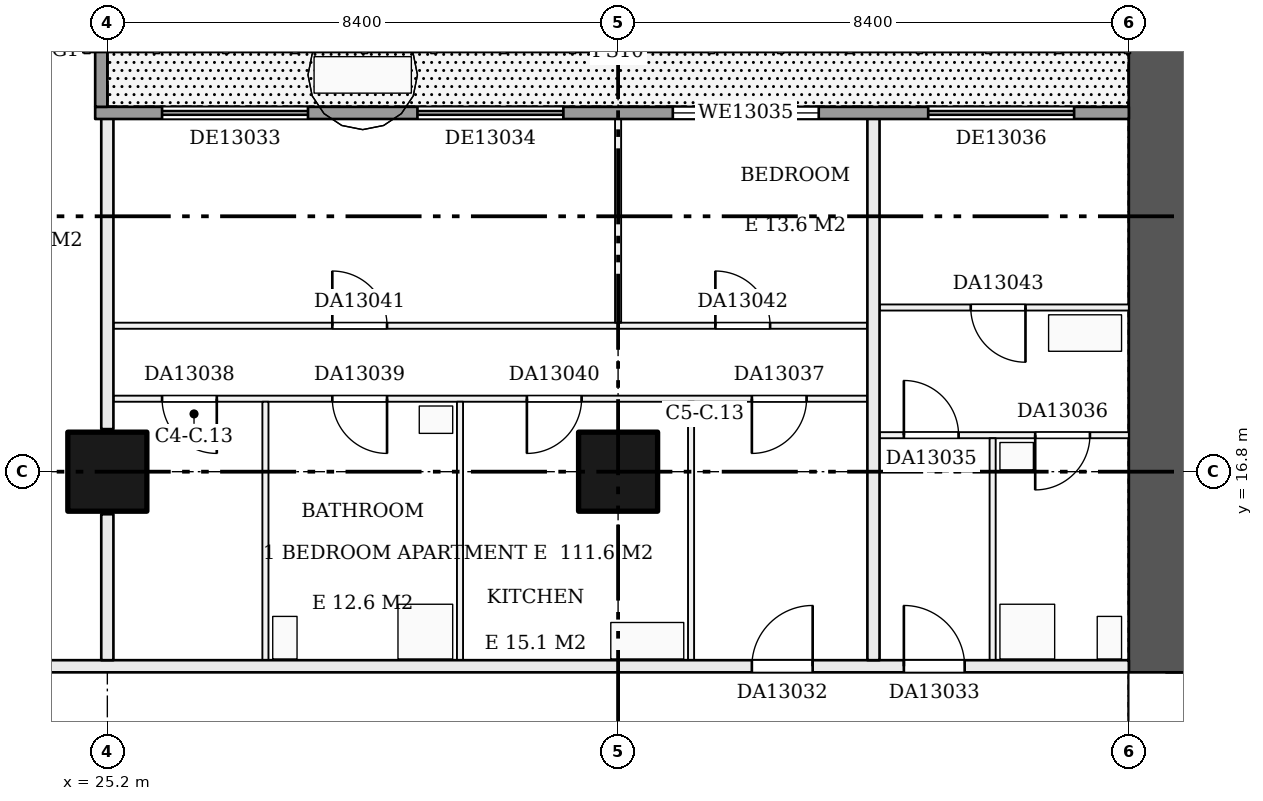
"""IFC4 building model, lengths in metres.
Left out: names, types, materials, properties, quantities, classifications, styles, units other than length and angle.
Written with IfcOpenShell. Run it as: python <this file> out.ifc"""

import sys

from ifc_helpers import new_model, si_unit, direction, frame, frame_2d, origin, origin_2d, place, context, subcontext, project, spatial, rectangle, extrude, element, fill, save


model = new_model("IFC4")
c1 = context("Model", 3, precision=1e-05, world=origin(), true_north=direction((0.0, 1.0)))
c2 = subcontext(c1, "Body", "Model", "MODEL_VIEW")
j1 = project(units=[si_unit("LENGTHUNIT", "METRE"), si_unit("PLANEANGLEUNIT", "RADIAN")], contexts=[c1])
p1 = place(None, origin())
s1 = spatial("IfcSite", under=j1, at=p1, CompositionType="ELEMENT")
p2 = place(p1, origin())
s2 = spatial("IfcBuilding", under=s1, at=p2, CompositionType="ELEMENT")
p3 = place(p2, frame((0.0, 0.0, 56.7)))
s3 = spatial("IfcBuildingStorey", under=s2, at=p3, CompositionType="ELEMENT", Elevation=56.7)
for number, where, z_axis, x_axis in (
    (1, (25.2, 16.8, 0.0), (0.0, 0.0, 1.0), (1.0, 0.0, 0.0)),
    (2, (33.6, 16.8, 0.0), (0.0, 0.0, 1.0), (1.0, 0.0, 0.0)),
):
    element("IfcColumn", number, at=place(p3, frame(where, z_axis=z_axis, x_axis=x_axis)), inside=s3, PredefinedType="COLUMN", context=c2, shape_type="SweptSolid", body=[
        extrude(rectangle(XDim=1.3, YDim=1.3, at=origin_2d()), origin(), (0.0, 0.0, 1.0), 3.22),
    ])
p4 = place(p3, frame((42.6, 9.6, 0.0), z_axis=(0.0, 0.0, 1.0), x_axis=(0.0, 1.0, 0.0)))
e3 = element("IfcWall", 3, at=p4, inside=s3, PredefinedType="SHEAR", context=c2, shape_type="SweptSolid", body=[
    extrude(rectangle(XDim=14.4, YDim=1.2, at=frame_2d((7.2, 0.0))), origin(), (0.0, 0.0, 1.0), 3.22),
])
p5 = place(p4, frame((2.1, 0.0, 0.0)))
e4 = element("IfcOpeningElement", 4, at=p5, cuts=e3, PredefinedType="OPENING", context=c2, shape_type="SweptSolid", body=[
    extrude(rectangle(XDim=1.8, YDim=2.1, at=frame_2d((0.9, 1.05))), frame((0.0, 0.61, 0.0), z_axis=(0.0, -1.0, 0.0), x_axis=(1.0, 0.0, 0.0)), (0.0, 0.0, 1.0), 1.22),
])
p6 = place(p3, frame((16.9, 13.6, 0.0), z_axis=(0.0, 0.0, 1.0), x_axis=(1.0, 0.0, 0.0)))
e5 = element("IfcWall", 5, at=p6, inside=s3, PredefinedType="PARTITIONING", context=c2, shape_type="SweptSolid", body=[
    extrude(rectangle(XDim=25.1, YDim=0.2, at=frame_2d((12.55, 0.0))), origin(), (0.0, 0.0, 1.0), 3.22),
])
p7 = place(p6, frame((18.9, 0.0, 0.0)))
e6 = element("IfcOpeningElement", 6, at=p7, cuts=e5, PredefinedType="OPENING", context=c2, shape_type="SweptSolid", body=[
    extrude(rectangle(XDim=1.0, YDim=2.1, at=frame_2d((0.5, 1.05))), frame((0.0, 0.11, 0.0), z_axis=(0.0, -1.0, 0.0), x_axis=(1.0, 0.0, 0.0)), (0.0, 0.0, 1.0), 0.22),
])
p8 = place(p6, frame((21.4, 0.0, 0.0)))
e7 = element("IfcOpeningElement", 7, at=p8, cuts=e5, PredefinedType="OPENING", context=c2, shape_type="SweptSolid", body=[
    extrude(rectangle(XDim=1.0, YDim=2.1, at=frame_2d((0.5, 1.05))), frame((0.0, 0.11, 0.0), z_axis=(0.0, -1.0, 0.0), x_axis=(1.0, 0.0, 0.0)), (0.0, 0.0, 1.0), 0.22),
])
p9 = place(p6, frame((5.2, 0.0, 0.0)))
e8 = element("IfcOpeningElement", 8, at=p9, cuts=e5, PredefinedType="OPENING", context=c2, shape_type="SweptSolid", body=[
    extrude(rectangle(XDim=1.0, YDim=2.1, at=frame_2d((0.5, 1.05))), frame((0.0, 0.11, 0.0), z_axis=(0.0, -1.0, 0.0), x_axis=(1.0, 0.0, 0.0)), (0.0, 0.0, 1.0), 0.22),
])
p10 = place(p3, frame((37.9, 17.4, 0.0), z_axis=(0.0, 0.0, 1.0), x_axis=(1.0, 0.0, 0.0)))
e9 = element("IfcWall", 9, at=p10, inside=s3, PredefinedType="PARTITIONING", context=c2, shape_type="SweptSolid", body=[
    extrude(rectangle(XDim=4.1, YDim=0.1, at=frame_2d((2.05, 0.0))), origin(), (0.0, 0.0, 1.0), 3.22),
])
p11 = place(p10, frame((0.4, 0.0, 0.0)))
e10 = element("IfcOpeningElement", 10, at=p11, cuts=e9, PredefinedType="OPENING", context=c2, shape_type="SweptSolid", body=[
    extrude(rectangle(XDim=0.9, YDim=2.1, at=frame_2d((0.45, 1.05))), frame((0.0, 0.06, 0.0), z_axis=(0.0, -1.0, 0.0), x_axis=(1.0, 0.0, 0.0)), (0.0, 0.0, 1.0), 0.12),
])
p12 = place(p10, frame((2.56, 0.0, 0.0)))
e11 = element("IfcOpeningElement", 11, at=p12, cuts=e9, PredefinedType="OPENING", context=c2, shape_type="SweptSolid", body=[
    extrude(rectangle(XDim=0.9, YDim=2.1, at=frame_2d((0.45, 1.05))), frame((0.0, 0.06, 0.0), z_axis=(0.0, -1.0, 0.0), x_axis=(1.0, 0.0, 0.0)), (0.0, 0.0, 1.0), 0.12),
])
p13 = place(p3, frame((25.3, 18.0, 0.0), z_axis=(0.0, 0.0, 1.0), x_axis=(1.0, 0.0, 0.0)))
e12 = element("IfcWall", 12, at=p13, inside=s3, PredefinedType="PARTITIONING", context=c2, shape_type="SweptSolid", body=[
    extrude(rectangle(XDim=12.4, YDim=0.1, at=frame_2d((6.2, 0.0))), origin(), (0.0, 0.0, 1.0), 3.22),
])
p14 = place(p13, frame((10.5, 0.0, 0.0)))
e13 = element("IfcOpeningElement", 13, at=p14, cuts=e12, PredefinedType="OPENING", context=c2, shape_type="SweptSolid", body=[
    extrude(rectangle(XDim=0.9, YDim=2.1, at=frame_2d((0.45, 1.05))), frame((0.0, 0.06, 0.0), z_axis=(0.0, -1.0, 0.0), x_axis=(1.0, 0.0, 0.0)), (0.0, 0.0, 1.0), 0.12),
])
p15 = place(p13, frame((0.8, 0.0, 0.0)))
e14 = element("IfcOpeningElement", 14, at=p15, cuts=e12, PredefinedType="OPENING", context=c2, shape_type="SweptSolid", body=[
    extrude(rectangle(XDim=0.9, YDim=2.1, at=frame_2d((0.45, 1.05))), frame((0.0, 0.06, 0.0), z_axis=(0.0, -1.0, 0.0), x_axis=(1.0, 0.0, 0.0)), (0.0, 0.0, 1.0), 0.12),
])
p16 = place(p13, frame((3.6, 0.0, 0.0)))
e15 = element("IfcOpeningElement", 15, at=p16, cuts=e12, PredefinedType="OPENING", context=c2, shape_type="SweptSolid", body=[
    extrude(rectangle(XDim=0.9, YDim=2.1, at=frame_2d((0.45, 1.05))), frame((0.0, 0.06, 0.0), z_axis=(0.0, -1.0, 0.0), x_axis=(1.0, 0.0, 0.0)), (0.0, 0.0, 1.0), 0.12),
])
p17 = place(p13, frame((6.8, 0.0, 0.0)))
e16 = element("IfcOpeningElement", 16, at=p17, cuts=e12, PredefinedType="OPENING", context=c2, shape_type="SweptSolid", body=[
    extrude(rectangle(XDim=0.9, YDim=2.1, at=frame_2d((0.45, 1.05))), frame((0.0, 0.06, 0.0), z_axis=(0.0, -1.0, 0.0), x_axis=(1.0, 0.0, 0.0)), (0.0, 0.0, 1.0), 0.12),
])
p18 = place(p3, frame((25.3, 19.2, 0.0), z_axis=(0.0, 0.0, 1.0), x_axis=(1.0, 0.0, 0.0)))
e17 = element("IfcWall", 17, at=p18, inside=s3, PredefinedType="PARTITIONING", context=c2, shape_type="SweptSolid", body=[
    extrude(rectangle(XDim=12.4, YDim=0.1, at=frame_2d((6.2, 0.0))), origin(), (0.0, 0.0, 1.0), 3.22),
])
p19 = place(p18, frame((3.6, 0.0, 0.0)))
e18 = element("IfcOpeningElement", 18, at=p19, cuts=e17, PredefinedType="OPENING", context=c2, shape_type="SweptSolid", body=[
    extrude(rectangle(XDim=0.9, YDim=2.1, at=frame_2d((0.45, 1.05))), frame((0.0, 0.06, 0.0), z_axis=(0.0, -1.0, 0.0), x_axis=(1.0, 0.0, 0.0)), (0.0, 0.0, 1.0), 0.12),
])
p20 = place(p18, frame((9.9, 0.0, 0.0)))
e19 = element("IfcOpeningElement", 19, at=p20, cuts=e17, PredefinedType="OPENING", context=c2, shape_type="SweptSolid", body=[
    extrude(rectangle(XDim=0.9, YDim=2.1, at=frame_2d((0.45, 1.05))), frame((0.0, 0.06, 0.0), z_axis=(0.0, -1.0, 0.0), x_axis=(1.0, 0.0, 0.0)), (0.0, 0.0, 1.0), 0.12),
])
p21 = place(p3, frame((37.9, 19.5, 0.0), z_axis=(0.0, 0.0, 1.0), x_axis=(1.0, 0.0, 0.0)))
e20 = element("IfcWall", 20, at=p21, inside=s3, PredefinedType="PARTITIONING", context=c2, shape_type="SweptSolid", body=[
    extrude(rectangle(XDim=4.1, YDim=0.1, at=frame_2d((2.05, 0.0))), origin(), (0.0, 0.0, 1.0), 3.22),
])
p22 = place(p21, frame((1.5, 0.0, 0.0)))
e21 = element("IfcOpeningElement", 21, at=p22, cuts=e20, PredefinedType="OPENING", context=c2, shape_type="SweptSolid", body=[
    extrude(rectangle(XDim=0.9, YDim=2.1, at=frame_2d((0.45, 1.05))), frame((0.0, 0.06, 0.0), z_axis=(0.0, -1.0, 0.0), x_axis=(1.0, 0.0, 0.0)), (0.0, 0.0, 1.0), 0.12),
])
p23 = place(p3, frame((25.2, 13.7, 0.0), z_axis=(0.0, 0.0, 1.0), x_axis=(0.0, 1.0, 0.0)))
e22 = element("IfcWall", 22, at=p23, inside=s3, PredefinedType="PARTITIONING", context=c2, shape_type="SweptSolid", body=[
    extrude(rectangle(XDim=2.4, YDim=0.2, at=frame_2d((1.2, 0.0))), origin(), (0.0, 0.0, 1.0), 3.22),
])
p24 = place(p3, frame((25.2, 17.5, 0.0), z_axis=(0.0, 0.0, 1.0), x_axis=(0.0, 1.0, 0.0)))
e23 = element("IfcWall", 23, at=p24, inside=s3, PredefinedType="PARTITIONING", context=c2, shape_type="SweptSolid", body=[
    extrude(rectangle(XDim=5.2, YDim=0.2, at=frame_2d((2.6, 0.0))), origin(), (0.0, 0.0, 1.0), 3.22),
])
for number, where, z_axis, x_axis in (
    (24, (27.8, 13.7, 0.0), (0.0, 0.0, 1.0), (0.0, 1.0, 0.0)),
    (25, (31.0, 13.7, 0.0), (0.0, 0.0, 1.0), (0.0, 1.0, 0.0)),
):
    element("IfcWall", number, at=place(p3, frame(where, z_axis=z_axis, x_axis=x_axis)), inside=s3, PredefinedType="PARTITIONING", context=c2, shape_type="SweptSolid", body=[
        extrude(rectangle(XDim=4.25, YDim=0.1, at=frame_2d((2.125, 0.0))), origin(), (0.0, 0.0, 1.0), 3.22),
    ])
p25 = place(p3, frame((33.6, 19.25, 0.0), z_axis=(0.0, 0.0, 1.0), x_axis=(0.0, 1.0, 0.0)))
e26 = element("IfcWall", 26, at=p25, inside=s3, PredefinedType="PARTITIONING", context=c2, shape_type="SweptSolid", body=[
    extrude(rectangle(XDim=3.45, YDim=0.1, at=frame_2d((1.725, 0.0))), origin(), (0.0, 0.0, 1.0), 3.22),
])
p26 = place(p3, frame((34.8, 13.7, 0.0), z_axis=(0.0, 0.0, 1.0), x_axis=(0.0, 1.0, 0.0)))
e27 = element("IfcWall", 27, at=p26, inside=s3, PredefinedType="PARTITIONING", context=c2, shape_type="SweptSolid", body=[
    extrude(rectangle(XDim=4.25, YDim=0.1, at=frame_2d((2.125, 0.0))), origin(), (0.0, 0.0, 1.0), 3.22),
])
p27 = place(p3, frame((37.8, 13.7, 0.0), z_axis=(0.0, 0.0, 1.0), x_axis=(0.0, 1.0, 0.0)))
e28 = element("IfcWall", 28, at=p27, inside=s3, PredefinedType="PARTITIONING", context=c2, shape_type="SweptSolid", body=[
    extrude(rectangle(XDim=9.0, YDim=0.2, at=frame_2d((4.5, 0.0))), origin(), (0.0, 0.0, 1.0), 3.22),
])
p28 = place(p3, frame((39.76, 13.7, 0.0), z_axis=(0.0, 0.0, 1.0), x_axis=(0.0, 1.0, 0.0)))
e29 = element("IfcWall", 29, at=p28, inside=s3, PredefinedType="PARTITIONING", context=c2, shape_type="SweptSolid", body=[
    extrude(rectangle(XDim=3.65, YDim=0.1, at=frame_2d((1.825, 0.0))), origin(), (0.0, 0.0, 1.0), 3.22),
])
p29 = place(p3, frame((42.0, 22.7, 0.0), z_axis=(0.0, 0.0, 1.0), x_axis=(-1.0, 0.0, 0.0)))
e30 = element("IfcWall", 30, at=p29, inside=s3, PredefinedType="SOLIDWALL", context=c2, shape_type="SweptSolid", body=[
    extrude(rectangle(XDim=17.0, YDim=0.2, at=frame_2d((8.5, 0.0))), origin(), (0.0, 0.0, 1.0), 3.22),
])
p30 = place(p29, frame((13.5, 0.0, 0.0)))
e31 = element("IfcOpeningElement", 31, at=p30, cuts=e30, PredefinedType="OPENING", context=c2, shape_type="SweptSolid", body=[
    extrude(rectangle(XDim=2.4, YDim=2.2, at=frame_2d((1.2, 1.1))), frame((0.0, 0.11, 0.0), z_axis=(0.0, -1.0, 0.0), x_axis=(1.0, 0.0, 0.0)), (0.0, 0.0, 1.0), 0.22),
])
p31 = place(p29, frame((9.3, 0.0, 0.0)))
e32 = element("IfcOpeningElement", 32, at=p31, cuts=e30, PredefinedType="OPENING", context=c2, shape_type="SweptSolid", body=[
    extrude(rectangle(XDim=2.4, YDim=2.2, at=frame_2d((1.2, 1.1))), frame((0.0, 0.11, 0.0), z_axis=(0.0, -1.0, 0.0), x_axis=(1.0, 0.0, 0.0)), (0.0, 0.0, 1.0), 0.22),
])
p32 = place(p29, frame((5.1, 0.0, 0.9)))
e33 = element("IfcOpeningElement", 33, at=p32, cuts=e30, PredefinedType="OPENING", context=c2, shape_type="SweptSolid", body=[
    extrude(rectangle(XDim=2.4, YDim=1.5, at=frame_2d((1.2, 0.75))), frame((0.0, 0.11, 0.0), z_axis=(0.0, -1.0, 0.0), x_axis=(1.0, 0.0, 0.0)), (0.0, 0.0, 1.0), 0.22),
])
p33 = place(p29, frame((0.9, 0.0, 0.0)))
e34 = element("IfcOpeningElement", 34, at=p33, cuts=e30, PredefinedType="OPENING", context=c2, shape_type="SweptSolid", body=[
    extrude(rectangle(XDim=2.4, YDim=2.2, at=frame_2d((1.2, 1.1))), frame((0.0, 0.11, 0.0), z_axis=(0.0, -1.0, 0.0), x_axis=(1.0, 0.0, 0.0)), (0.0, 0.0, 1.0), 0.22),
])
p34 = place(p3, frame((25.1, 22.8, 0.0), z_axis=(0.0, 0.0, 1.0), x_axis=(0.0, 1.0, 0.0)))
e35 = element("IfcWall", 35, at=p34, inside=s3, PredefinedType="SOLIDWALL", context=c2, shape_type="SweptSolid", body=[
    extrude(rectangle(XDim=1.7, YDim=0.2, at=frame_2d((0.85, 0.0))), origin(), (0.0, 0.0, 1.0), 3.22),
])
p35 = place(p5, frame((1.8, 0.0, 0.0), z_axis=(0.0, 0.0, 1.0), x_axis=(-1.0, 0.0, 0.0)))
e36 = element("IfcDoor", 36, at=p35, inside=s3, OperationType="DOUBLE_DOOR_SINGLE_SWING", PredefinedType="DOOR", context=c2, shape_type="SweptSolid", body=[
    extrude(rectangle(XDim=1.8, YDim=2.1, at=frame_2d((0.9, 1.05))), frame((0.0, 0.025, 0.0), z_axis=(0.0, -1.0, 0.0), x_axis=(1.0, 0.0, 0.0)), (0.0, 0.0, 1.0), 0.05),
])
fill(e4, e36)
p36 = place(p7, origin())
e37 = element("IfcDoor", 37, at=p36, inside=s3, OperationType="SINGLE_SWING_RIGHT", PredefinedType="DOOR", context=c2, shape_type="SweptSolid", body=[
    extrude(rectangle(XDim=1.0, YDim=2.1, at=frame_2d((0.5, 1.05))), frame((0.0, 0.025, 0.0), z_axis=(0.0, -1.0, 0.0), x_axis=(1.0, 0.0, 0.0)), (0.0, 0.0, 1.0), 0.05),
])
fill(e6, e37)
p37 = place(p8, origin())
e38 = element("IfcDoor", 38, at=p37, inside=s3, OperationType="SINGLE_SWING_LEFT", PredefinedType="DOOR", context=c2, shape_type="SweptSolid", body=[
    extrude(rectangle(XDim=1.0, YDim=2.1, at=frame_2d((0.5, 1.05))), frame((0.0, 0.025, 0.0), z_axis=(0.0, -1.0, 0.0), x_axis=(1.0, 0.0, 0.0)), (0.0, 0.0, 1.0), 0.05),
])
fill(e7, e38)
p38 = place(p11, origin())
e39 = element("IfcDoor", 39, at=p38, inside=s3, OperationType="SINGLE_SWING_LEFT", PredefinedType="DOOR", context=c2, shape_type="SweptSolid", body=[
    extrude(rectangle(XDim=0.9, YDim=2.1, at=frame_2d((0.45, 1.05))), frame((0.0, 0.025, 0.0), z_axis=(0.0, -1.0, 0.0), x_axis=(1.0, 0.0, 0.0)), (0.0, 0.0, 1.0), 0.05),
])
fill(e10, e39)
p39 = place(p12, frame((0.9, 0.0, 0.0), z_axis=(0.0, 0.0, 1.0), x_axis=(-1.0, 0.0, 0.0)))
e40 = element("IfcDoor", 40, at=p39, inside=s3, OperationType="SINGLE_SWING_RIGHT", PredefinedType="DOOR", context=c2, shape_type="SweptSolid", body=[
    extrude(rectangle(XDim=0.9, YDim=2.1, at=frame_2d((0.45, 1.05))), frame((0.0, 0.025, 0.0), z_axis=(0.0, -1.0, 0.0), x_axis=(1.0, 0.0, 0.0)), (0.0, 0.0, 1.0), 0.05),
])
fill(e11, e40)
p40 = place(p14, frame((0.9, 0.0, 0.0), z_axis=(0.0, 0.0, 1.0), x_axis=(-1.0, 0.0, 0.0)))
e41 = element("IfcDoor", 41, at=p40, inside=s3, OperationType="SINGLE_SWING_RIGHT", PredefinedType="DOOR", context=c2, shape_type="SweptSolid", body=[
    extrude(rectangle(XDim=0.9, YDim=2.1, at=frame_2d((0.45, 1.05))), frame((0.0, 0.025, 0.0), z_axis=(0.0, -1.0, 0.0), x_axis=(1.0, 0.0, 0.0)), (0.0, 0.0, 1.0), 0.05),
])
fill(e13, e41)
p41 = place(p15, frame((0.9, 0.0, 0.0), z_axis=(0.0, 0.0, 1.0), x_axis=(-1.0, 0.0, 0.0)))
e42 = element("IfcDoor", 42, at=p41, inside=s3, OperationType="SINGLE_SWING_LEFT", PredefinedType="DOOR", context=c2, shape_type="SweptSolid", body=[
    extrude(rectangle(XDim=0.9, YDim=2.1, at=frame_2d((0.45, 1.05))), frame((0.0, 0.025, 0.0), z_axis=(0.0, -1.0, 0.0), x_axis=(1.0, 0.0, 0.0)), (0.0, 0.0, 1.0), 0.05),
])
fill(e14, e42)
p42 = place(p16, frame((0.9, 0.0, 0.0), z_axis=(0.0, 0.0, 1.0), x_axis=(-1.0, 0.0, 0.0)))
e43 = element("IfcDoor", 43, at=p42, inside=s3, OperationType="SINGLE_SWING_LEFT", PredefinedType="DOOR", context=c2, shape_type="SweptSolid", body=[
    extrude(rectangle(XDim=0.9, YDim=2.1, at=frame_2d((0.45, 1.05))), frame((0.0, 0.025, 0.0), z_axis=(0.0, -1.0, 0.0), x_axis=(1.0, 0.0, 0.0)), (0.0, 0.0, 1.0), 0.05),
])
fill(e15, e43)
p43 = place(p17, frame((0.9, 0.0, 0.0), z_axis=(0.0, 0.0, 1.0), x_axis=(-1.0, 0.0, 0.0)))
e44 = element("IfcDoor", 44, at=p43, inside=s3, OperationType="SINGLE_SWING_RIGHT", PredefinedType="DOOR", context=c2, shape_type="SweptSolid", body=[
    extrude(rectangle(XDim=0.9, YDim=2.1, at=frame_2d((0.45, 1.05))), frame((0.0, 0.025, 0.0), z_axis=(0.0, -1.0, 0.0), x_axis=(1.0, 0.0, 0.0)), (0.0, 0.0, 1.0), 0.05),
])
fill(e16, e44)
p44 = place(p19, origin())
e45 = element("IfcDoor", 45, at=p44, inside=s3, OperationType="SINGLE_SWING_LEFT", PredefinedType="DOOR", context=c2, shape_type="SweptSolid", body=[
    extrude(rectangle(XDim=0.9, YDim=2.1, at=frame_2d((0.45, 1.05))), frame((0.0, 0.025, 0.0), z_axis=(0.0, -1.0, 0.0), x_axis=(1.0, 0.0, 0.0)), (0.0, 0.0, 1.0), 0.05),
])
fill(e18, e45)
p45 = place(p20, origin())
e46 = element("IfcDoor", 46, at=p45, inside=s3, OperationType="SINGLE_SWING_LEFT", PredefinedType="DOOR", context=c2, shape_type="SweptSolid", body=[
    extrude(rectangle(XDim=0.9, YDim=2.1, at=frame_2d((0.45, 1.05))), frame((0.0, 0.025, 0.0), z_axis=(0.0, -1.0, 0.0), x_axis=(1.0, 0.0, 0.0)), (0.0, 0.0, 1.0), 0.05),
])
fill(e19, e46)
p46 = place(p22, frame((0.9, 0.0, 0.0), z_axis=(0.0, 0.0, 1.0), x_axis=(-1.0, 0.0, 0.0)))
e47 = element("IfcDoor", 47, at=p46, inside=s3, OperationType="SINGLE_SWING_LEFT", PredefinedType="DOOR", context=c2, shape_type="SweptSolid", body=[
    extrude(rectangle(XDim=0.9, YDim=2.1, at=frame_2d((0.45, 1.05))), frame((0.0, 0.025, 0.0), z_axis=(0.0, -1.0, 0.0), x_axis=(1.0, 0.0, 0.0)), (0.0, 0.0, 1.0), 0.05),
])
fill(e21, e47)
p47 = place(p30, origin())
e48 = element("IfcDoor", 48, at=p47, inside=s3, OperationType="DOUBLE_DOOR_SLIDING", PredefinedType="DOOR", context=c2, shape_type="SweptSolid", body=[
    extrude(rectangle(XDim=2.4, YDim=2.2, at=frame_2d((1.2, 1.1))), frame((0.0, 0.025, 0.0), z_axis=(0.0, -1.0, 0.0), x_axis=(1.0, 0.0, 0.0)), (0.0, 0.0, 1.0), 0.05),
])
fill(e31, e48)
p48 = place(p31, origin())
e49 = element("IfcDoor", 49, at=p48, inside=s3, OperationType="DOUBLE_DOOR_SLIDING", PredefinedType="DOOR", context=c2, shape_type="SweptSolid", body=[
    extrude(rectangle(XDim=2.4, YDim=2.2, at=frame_2d((1.2, 1.1))), frame((0.0, 0.025, 0.0), z_axis=(0.0, -1.0, 0.0), x_axis=(1.0, 0.0, 0.0)), (0.0, 0.0, 1.0), 0.05),
])
fill(e32, e49)
p49 = place(p32, origin())
e50 = element("IfcWindow", 50, at=p49, inside=s3, PartitioningType="SINGLE_PANEL", PredefinedType="WINDOW", context=c2, shape_type="SweptSolid", body=[
    extrude(rectangle(XDim=2.4, YDim=1.5, at=frame_2d((1.2, 0.75))), frame((0.0, 0.03, 0.0), z_axis=(0.0, -1.0, 0.0), x_axis=(1.0, 0.0, 0.0)), (0.0, 0.0, 1.0), 0.06),
])
fill(e33, e50)
p50 = place(p33, origin())
e51 = element("IfcDoor", 51, at=p50, inside=s3, OperationType="DOUBLE_DOOR_SLIDING", PredefinedType="DOOR", context=c2, shape_type="SweptSolid", body=[
    extrude(rectangle(XDim=2.4, YDim=2.2, at=frame_2d((1.2, 1.1))), frame((0.0, 0.025, 0.0), z_axis=(0.0, -1.0, 0.0), x_axis=(1.0, 0.0, 0.0)), (0.0, 0.0, 1.0), 0.05),
])
fill(e34, e51)
save(model, sys.argv[1])
